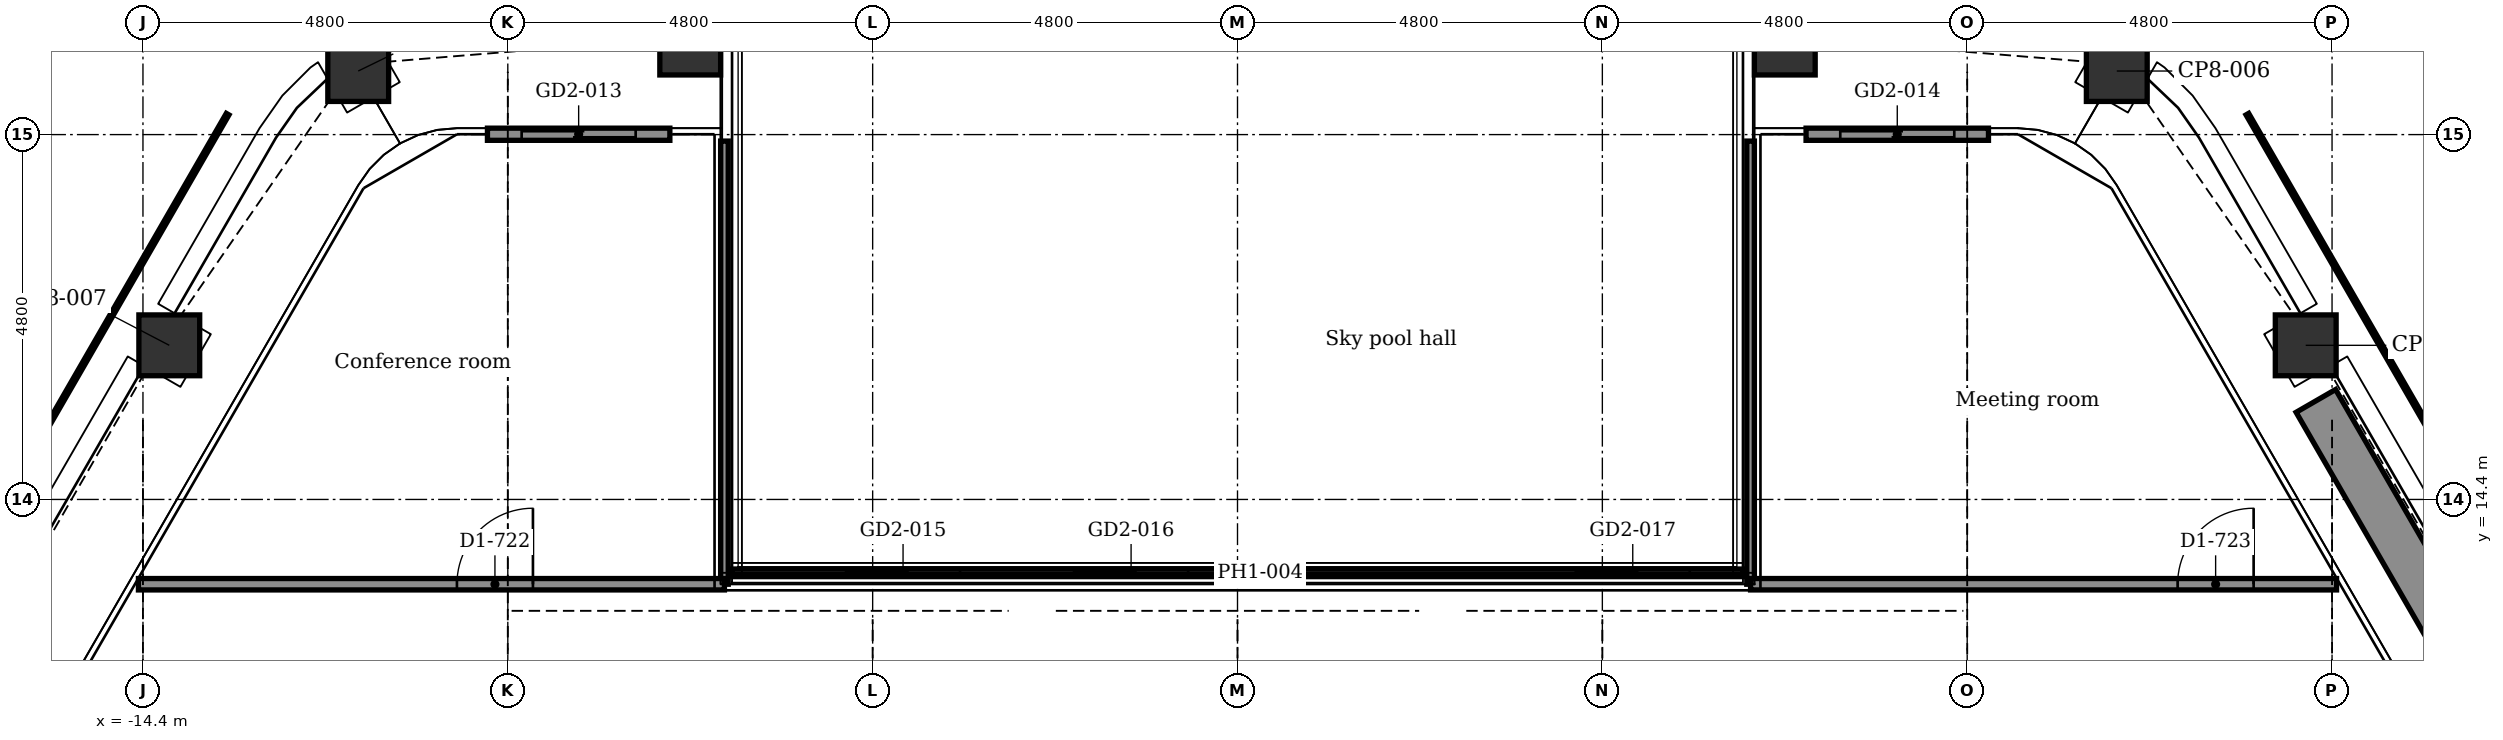
"""IFC4 building model, lengths in metres.
Left out: names, types, materials, properties, quantities, classifications, styles, units other than length and angle.
Written with IfcOpenShell. Run it as: python <this file> out.ifc"""

import sys

from ifc_helpers import new_model, si_unit, direction, frame, frame_2d, origin, origin_2d, place, context, subcontext, project, spatial, rectangle, extrude, element, fill, save


model = new_model("IFC4")
c1 = context("Model", 3, precision=1e-05, world=origin(), true_north=direction((0.0, 1.0)))
c2 = subcontext(c1, "Body", "Model", "MODEL_VIEW")
j1 = project(units=[si_unit("LENGTHUNIT", "METRE"), si_unit("PLANEANGLEUNIT", "RADIAN")], contexts=[c1])
p1 = place(None, origin())
s1 = spatial("IfcSite", under=j1, at=p1, CompositionType="ELEMENT")
p2 = place(p1, origin())
s2 = spatial("IfcBuilding", under=s1, at=p2, CompositionType="ELEMENT")
p3 = place(p2, frame((0.0, 0.0, 269.6)))
s3 = spatial("IfcBuildingStorey", under=s2, at=p3, CompositionType="ELEMENT", Elevation=269.6)
for number, where, z_axis, x_axis in (
    (1, (-11.568, 20.036, -0.15), (0.0, 0.0, 1.0), (0.866, 0.5, 0.0)),
    (2, (-7.2, 20.385, -0.15), (0.0, 0.0, 1.0), (1.0, 0.0, 0.0)),
    (3, (7.2, 20.385, -0.15), (0.0, 0.0, 1.0), (1.0, 0.0, 0.0)),
    (4, (11.568, 20.036, -0.15), (0.0, 0.0, 1.0), (0.5, 0.866, 0.0)),
    (5, (14.054, 16.428, -0.15), (0.0, 0.0, 1.0), (0.866, 0.5, 0.0)),
    (6, (-14.054, 16.428, -0.15), (0.0, 0.0, 1.0), (0.5, 0.866, 0.0)),
):
    element("IfcColumn", number, at=place(p3, frame(where, z_axis=z_axis, x_axis=x_axis)), inside=s3, PredefinedType="COLUMN", context=c2, shape_type="SweptSolid", body=[
        extrude(rectangle(XDim=0.8, YDim=0.8, at=origin_2d()), origin(), (0.0, 0.0, 1.0), 3.9),
    ])
p4 = place(p3, frame((-9.868, 19.205, 0.0), z_axis=(0.0, 0.0, 1.0), x_axis=(1.0, 0.0, 0.0)))
e7 = element("IfcWall", 7, at=p4, inside=s3, PredefinedType="PARTITIONING", context=c2, shape_type="SweptSolid", body=[
    extrude(rectangle(XDim=2.4, YDim=0.16, at=frame_2d((1.2, 0.0))), origin(), (0.0, 0.0, 1.0), 3.75),
])
p5 = place(p4, frame((0.45, 0.0, 0.0)))
e8 = element("IfcOpeningElement", 8, at=p5, cuts=e7, PredefinedType="OPENING", context=c2, shape_type="SweptSolid", body=[
    extrude(rectangle(XDim=1.5, YDim=2.4, at=frame_2d((0.75, 1.2))), frame((0.0, 0.09, 0.0), z_axis=(0.0, -1.0, 0.0), x_axis=(1.0, 0.0, 0.0)), (0.0, 0.0, 1.0), 0.18),
])
p6 = place(p3, frame((7.48, 19.205, 0.0), z_axis=(0.0, 0.0, 1.0), x_axis=(1.0, 0.0, 0.0)))
e9 = element("IfcWall", 9, at=p6, inside=s3, PredefinedType="PARTITIONING", context=c2, shape_type="SweptSolid", body=[
    extrude(rectangle(XDim=2.4, YDim=0.16, at=frame_2d((1.2, 0.0))), origin(), (0.0, 0.0, 1.0), 3.75),
])
p7 = place(p6, frame((0.45, 0.0, 0.0)))
e10 = element("IfcOpeningElement", 10, at=p7, cuts=e9, PredefinedType="OPENING", context=c2, shape_type="SweptSolid", body=[
    extrude(rectangle(XDim=1.5, YDim=2.4, at=frame_2d((0.75, 1.2))), frame((0.0, 0.09, 0.0), z_axis=(0.0, -1.0, 0.0), x_axis=(1.0, 0.0, 0.0)), (0.0, 0.0, 1.0), 0.18),
])
p8 = place(p3, frame((14.187, 15.697, 0.0), z_axis=(0.0, 0.0, 1.0), x_axis=(0.499977295307, -0.866038511948, 0.0)))
e11 = element("IfcWall", 11, at=p8, inside=s3, PredefinedType="USERDEFINED", context=c2, shape_type="SweptSolid", body=[
    extrude(rectangle(XDim=3.4, YDim=0.6, at=frame_2d((1.7, 0.0))), origin(), (0.0, 0.0, 1.0), 0.7),
])
p9 = place(p3, frame((6.65, 13.435, 0.0), z_axis=(0.0, 0.0, 1.0), x_axis=(-1.0, 0.0, 0.0)))
e12 = element("IfcWall", 12, at=p9, inside=s3, PredefinedType="PARAPET", context=c2, shape_type="SweptSolid", body=[
    extrude(rectangle(XDim=13.3, YDim=0.1, at=frame_2d((6.65, 0.0))), origin(), (0.0, 0.0, 1.0), 2.5),
])
p10 = place(p9, frame((10.3, 0.0, 0.0)))
e13 = element("IfcOpeningElement", 13, at=p10, cuts=e12, PredefinedType="OPENING", context=c2, shape_type="SweptSolid", body=[
    extrude(rectangle(XDim=1.5, YDim=2.4, at=frame_2d((0.75, 1.2))), frame((0.0, 0.06, 0.0), z_axis=(0.0, -1.0, 0.0), x_axis=(1.0, 0.0, 0.0)), (0.0, 0.0, 1.0), 0.12),
])
p11 = place(p9, frame((7.3, 0.0, 0.0)))
e14 = element("IfcOpeningElement", 14, at=p11, cuts=e12, PredefinedType="OPENING", context=c2, shape_type="SweptSolid", body=[
    extrude(rectangle(XDim=1.5, YDim=2.4, at=frame_2d((0.75, 1.2))), frame((0.0, 0.06, 0.0), z_axis=(0.0, -1.0, 0.0), x_axis=(1.0, 0.0, 0.0)), (0.0, 0.0, 1.0), 0.12),
])
p12 = place(p9, frame((0.7, 0.0, 0.0)))
e15 = element("IfcOpeningElement", 15, at=p12, cuts=e12, PredefinedType="OPENING", context=c2, shape_type="SweptSolid", body=[
    extrude(rectangle(XDim=1.5, YDim=2.4, at=frame_2d((0.75, 1.2))), frame((0.0, 0.06, 0.0), z_axis=(0.0, -1.0, 0.0), x_axis=(1.0, 0.0, 0.0)), (0.0, 0.0, 1.0), 0.12),
])
for number, where, z_axis, x_axis in (
    (16, (6.75, 13.285, 0.0), (0.0, 0.0, 1.0), (0.0, 1.0, 0.0)),
    (17, (-6.75, 13.285, 0.0), (0.0, 0.0, 1.0), (0.0, 1.0, 0.0)),
):
    element("IfcWall", number, at=place(p3, frame(where, z_axis=z_axis, x_axis=x_axis)), inside=s3, PredefinedType="PARTITIONING", context=c2, shape_type="SweptSolid", body=[
        extrude(rectangle(XDim=5.83, YDim=0.1, at=frame_2d((2.915, 0.0))), origin(), (0.0, 0.0, 1.0), 3.75),
    ])
p13 = place(p3, frame((-14.459, 13.285, 0.0), z_axis=(0.0, 0.0, 1.0), x_axis=(1.0, 0.0, 0.0)))
e18 = element("IfcWall", 18, at=p13, inside=s3, PredefinedType="PARTITIONING", context=c2, shape_type="SweptSolid", body=[
    extrude(rectangle(XDim=7.709, YDim=0.15, at=frame_2d((3.855, 0.0))), origin(), (0.0, 0.0, 1.0), 3.75),
])
p14 = place(p13, frame((4.19, 0.0, 0.0)))
e19 = element("IfcOpeningElement", 19, at=p14, cuts=e18, PredefinedType="OPENING", context=c2, shape_type="SweptSolid", body=[
    extrude(rectangle(XDim=1.0, YDim=2.1, at=frame_2d((0.5, 1.05))), frame((0.0, 0.085, 0.0), z_axis=(0.0, -1.0, 0.0), x_axis=(1.0, 0.0, 0.0)), (0.0, 0.0, 1.0), 0.17),
])
p15 = place(p3, frame((6.75, 13.285, 0.0), z_axis=(0.0, 0.0, 1.0), x_axis=(1.0, 0.0, 0.0)))
e20 = element("IfcWall", 20, at=p15, inside=s3, PredefinedType="PARTITIONING", context=c2, shape_type="SweptSolid", body=[
    extrude(rectangle(XDim=7.709, YDim=0.15, at=frame_2d((3.855, 0.0))), origin(), (0.0, 0.0, 1.0), 3.75),
])
p16 = place(p15, frame((5.618, 0.0, 0.0)))
e21 = element("IfcOpeningElement", 21, at=p16, cuts=e20, PredefinedType="OPENING", context=c2, shape_type="SweptSolid", body=[
    extrude(rectangle(XDim=1.0, YDim=2.1, at=frame_2d((0.5, 1.05))), frame((0.0, 0.085, 0.0), z_axis=(0.0, -1.0, 0.0), x_axis=(1.0, 0.0, 0.0)), (0.0, 0.0, 1.0), 0.17),
])
p17 = place(p5, origin())
e22 = element("IfcDoor", 22, at=p17, inside=s3, OperationType="DOUBLE_DOOR_SLIDING", PredefinedType="DOOR", context=c2, shape_type="SweptSolid", body=[
    extrude(rectangle(XDim=1.5, YDim=2.4, at=frame_2d((0.75, 1.2))), frame((0.0, 0.025, 0.0), z_axis=(0.0, -1.0, 0.0), x_axis=(1.0, 0.0, 0.0)), (0.0, 0.0, 1.0), 0.05),
])
fill(e8, e22)
p18 = place(p7, origin())
e23 = element("IfcDoor", 23, at=p18, inside=s3, OperationType="DOUBLE_DOOR_SLIDING", PredefinedType="DOOR", context=c2, shape_type="SweptSolid", body=[
    extrude(rectangle(XDim=1.5, YDim=2.4, at=frame_2d((0.75, 1.2))), frame((0.0, 0.025, 0.0), z_axis=(0.0, -1.0, 0.0), x_axis=(1.0, 0.0, 0.0)), (0.0, 0.0, 1.0), 0.05),
])
fill(e10, e23)
p19 = place(p10, origin())
e24 = element("IfcDoor", 24, at=p19, inside=s3, OperationType="DOUBLE_DOOR_SLIDING", PredefinedType="DOOR", context=c2, shape_type="SweptSolid", body=[
    extrude(rectangle(XDim=1.5, YDim=2.4, at=frame_2d((0.75, 1.2))), frame((0.0, 0.025, 0.0), z_axis=(0.0, -1.0, 0.0), x_axis=(1.0, 0.0, 0.0)), (0.0, 0.0, 1.0), 0.05),
])
fill(e13, e24)
p20 = place(p11, origin())
e25 = element("IfcDoor", 25, at=p20, inside=s3, OperationType="DOUBLE_DOOR_SLIDING", PredefinedType="DOOR", context=c2, shape_type="SweptSolid", body=[
    extrude(rectangle(XDim=1.5, YDim=2.4, at=frame_2d((0.75, 1.2))), frame((0.0, 0.025, 0.0), z_axis=(0.0, -1.0, 0.0), x_axis=(1.0, 0.0, 0.0)), (0.0, 0.0, 1.0), 0.05),
])
fill(e14, e25)
p21 = place(p12, origin())
e26 = element("IfcDoor", 26, at=p21, inside=s3, OperationType="DOUBLE_DOOR_SLIDING", PredefinedType="DOOR", context=c2, shape_type="SweptSolid", body=[
    extrude(rectangle(XDim=1.5, YDim=2.4, at=frame_2d((0.75, 1.2))), frame((0.0, 0.025, 0.0), z_axis=(0.0, -1.0, 0.0), x_axis=(1.0, 0.0, 0.0)), (0.0, 0.0, 1.0), 0.05),
])
fill(e15, e26)
p22 = place(p14, origin())
e27 = element("IfcDoor", 27, at=p22, inside=s3, OperationType="SINGLE_SWING_RIGHT", PredefinedType="DOOR", context=c2, shape_type="SweptSolid", body=[
    extrude(rectangle(XDim=1.0, YDim=2.1, at=frame_2d((0.5, 1.05))), frame((0.0, 0.025, 0.0), z_axis=(0.0, -1.0, 0.0), x_axis=(1.0, 0.0, 0.0)), (0.0, 0.0, 1.0), 0.05),
])
fill(e19, e27)
p23 = place(p16, origin())
e28 = element("IfcDoor", 28, at=p23, inside=s3, OperationType="SINGLE_SWING_RIGHT", PredefinedType="DOOR", context=c2, shape_type="SweptSolid", body=[
    extrude(rectangle(XDim=1.0, YDim=2.1, at=frame_2d((0.5, 1.05))), frame((0.0, 0.025, 0.0), z_axis=(0.0, -1.0, 0.0), x_axis=(1.0, 0.0, 0.0)), (0.0, 0.0, 1.0), 0.05),
])
fill(e21, e28)
save(model, sys.argv[1])
